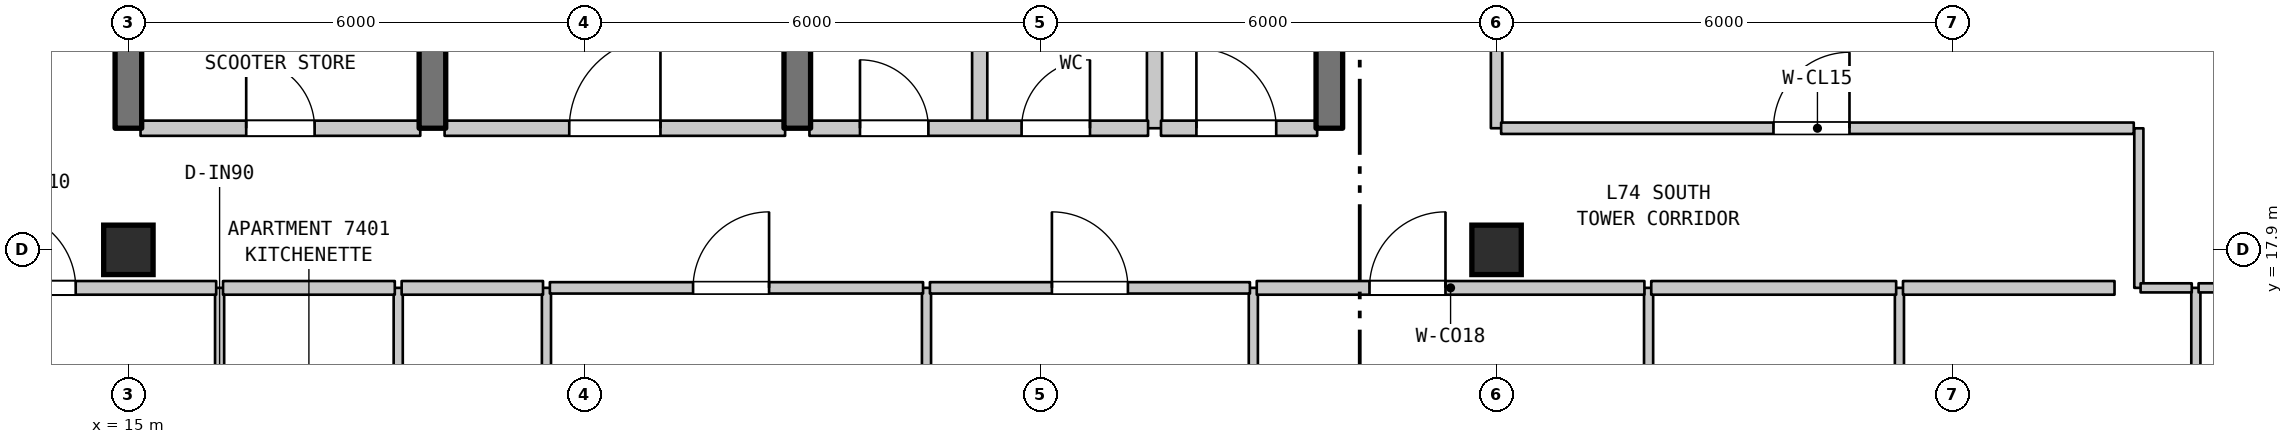
"""IFC4 building model, lengths in metres.
Left out: names, types, materials, properties, quantities, classifications, styles, units other than length and angle.
Written with IfcOpenShell. Run it as: python <this file> out.ifc"""

import sys

from ifc_helpers import new_model, si_unit, direction, frame, frame_2d, origin, origin_2d, place, context, subcontext, project, spatial, rectangle, extrude, element, fill, save


model = new_model("IFC4")
c1 = context("Model", 3, precision=1e-05, world=origin(), true_north=direction((0.0, 1.0)))
c2 = subcontext(c1, "Body", "Model", "MODEL_VIEW")
j1 = project(units=[si_unit("LENGTHUNIT", "METRE"), si_unit("PLANEANGLEUNIT", "RADIAN")], contexts=[c1])
p1 = place(None, origin())
s1 = spatial("IfcSite", under=j1, at=p1, CompositionType="ELEMENT")
p2 = place(p1, origin())
s2 = spatial("IfcBuilding", under=s1, at=p2, CompositionType="ELEMENT")
p3 = place(p2, frame((0.0, 0.0, 295.4)))
s3 = spatial("IfcBuildingStorey", under=s2, at=p3, CompositionType="ELEMENT", Elevation=295.4)
for number, where, z_axis, x_axis in (
    (1, (15.0, 17.9, 0.0), (0.0, 0.0, 1.0), (1.0, 0.0, 0.0)),
    (2, (33.0, 17.9, 0.0), (0.0, 0.0, 1.0), (1.0, 0.0, 0.0)),
):
    element("IfcColumn", number, at=place(p3, frame(where, z_axis=z_axis, x_axis=x_axis)), inside=s3, PredefinedType="COLUMN", context=c2, shape_type="SweptSolid", body=[
        extrude(rectangle(XDim=0.65, YDim=0.65, at=origin_2d()), origin(), (0.0, 0.0, 1.0), 3.7),
    ])
p4 = place(p3, frame((15.0, 19.5, 0.0), z_axis=(0.0, 0.0, 1.0), x_axis=(0.0, 1.0, 0.0)))
e3 = element("IfcWall", 3, at=p4, inside=s3, PredefinedType="SHEAR", context=c2, shape_type="SweptSolid", body=[
    extrude(rectangle(XDim=3.2, YDim=0.35, at=frame_2d((1.6, 0.0))), origin(), (0.0, 0.0, 1.0), 3.38),
])
p5 = place(p3, frame((16.2, 14.2, 0.0), z_axis=(0.0, 0.0, 1.0), x_axis=(0.0, 1.0, 0.0)))
e4 = element("IfcWall", 4, at=p5, inside=s3, PredefinedType="PARTITIONING", context=c2, shape_type="SweptSolid", body=[
    extrude(rectangle(XDim=3.2, YDim=0.12, at=frame_2d((1.6, 0.0))), origin(), (0.0, 0.0, 1.0), 3.38),
])
p6 = place(p5, frame((1.15, 0.0, 0.0)))
e5 = element("IfcOpeningElement", 5, at=p6, cuts=e4, PredefinedType="OPENING", context=c2, shape_type="SweptSolid", body=[
    extrude(rectangle(XDim=0.9, YDim=2.15, at=frame_2d((0.45, 1.075))), frame((0.0, 0.07, 0.0), z_axis=(0.0, -1.0, 0.0), x_axis=(1.0, 0.0, 0.0)), (0.0, 0.0, 1.0), 0.14),
])
p7 = place(p3, frame((18.55, 14.2, 0.0), z_axis=(0.0, 0.0, 1.0), x_axis=(0.0, 1.0, 0.0)))
e6 = element("IfcWall", 6, at=p7, inside=s3, PredefinedType="PARTITIONING", context=c2, shape_type="SweptSolid", body=[
    extrude(rectangle(XDim=3.2, YDim=0.12, at=frame_2d((1.6, 0.0))), origin(), (0.0, 0.0, 1.0), 3.38),
])
p8 = place(p3, frame((19.0, 19.5, 0.0), z_axis=(0.0, 0.0, 1.0), x_axis=(0.0, 1.0, 0.0)))
e7 = element("IfcWall", 7, at=p8, inside=s3, PredefinedType="SHEAR", context=c2, shape_type="SweptSolid", body=[
    extrude(rectangle(XDim=3.2, YDim=0.35, at=frame_2d((1.6, 0.0))), origin(), (0.0, 0.0, 1.0), 3.38),
])
p9 = place(p3, frame((20.5, 7.189, 0.0), z_axis=(0.0, 0.0, 1.0), x_axis=(0.0, 1.0, 0.0)))
e8 = element("IfcWall", 8, at=p9, inside=s3, PredefinedType="PARTITIONING", context=c2, shape_type="SweptSolid", body=[
    extrude(rectangle(XDim=10.211, YDim=0.12, at=frame_2d((5.105, 0.0))), origin(), (0.0, 0.0, 1.0), 3.38),
])
p10 = place(p3, frame((23.8, 19.5, 0.0), z_axis=(0.0, 0.0, 1.0), x_axis=(0.0, 1.0, 0.0)))
e9 = element("IfcWall", 9, at=p10, inside=s3, PredefinedType="SHEAR", context=c2, shape_type="SweptSolid", body=[
    extrude(rectangle(XDim=3.2, YDim=0.35, at=frame_2d((1.6, 0.0))), origin(), (0.0, 0.0, 1.0), 3.38),
])
p11 = place(p3, frame((25.5, 6.71, 0.0), z_axis=(0.0, 0.0, 1.0), x_axis=(0.0, 1.0, 0.0)))
e10 = element("IfcWall", 10, at=p11, inside=s3, PredefinedType="PARTITIONING", context=c2, shape_type="SweptSolid", body=[
    extrude(rectangle(XDim=10.69, YDim=0.12, at=frame_2d((5.345, 0.0))), origin(), (0.0, 0.0, 1.0), 3.38),
])
for number, where, z_axis, x_axis in (
    (11, (26.2, 19.5, 0.0), (0.0, 0.0, 1.0), (0.0, 1.0, 0.0)),
    (12, (28.5, 19.5, 0.0), (0.0, 0.0, 1.0), (0.0, 1.0, 0.0)),
):
    element("IfcWall", number, at=place(p3, frame(where, z_axis=z_axis, x_axis=x_axis)), inside=s3, PredefinedType="STANDARD", context=c2, shape_type="SweptSolid", body=[
        extrude(rectangle(XDim=3.2, YDim=0.2, at=frame_2d((1.6, 0.0))), origin(), (0.0, 0.0, 1.0), 3.38),
    ])
p12 = place(p3, frame((29.8, 6.71, 0.0), z_axis=(0.0, 0.0, 1.0), x_axis=(0.0, 1.0, 0.0)))
e13 = element("IfcWall", 13, at=p12, inside=s3, PredefinedType="PARTITIONING", context=c2, shape_type="SweptSolid", body=[
    extrude(rectangle(XDim=10.69, YDim=0.12, at=frame_2d((5.345, 0.0))), origin(), (0.0, 0.0, 1.0), 3.38),
])
p13 = place(p3, frame((30.8, 19.5, 0.0), z_axis=(0.0, 0.0, 1.0), x_axis=(0.0, 1.0, 0.0)))
e14 = element("IfcWall", 14, at=p13, inside=s3, PredefinedType="SHEAR", context=c2, shape_type="SweptSolid", body=[
    extrude(rectangle(XDim=3.2, YDim=0.35, at=frame_2d((1.6, 0.0))), origin(), (0.0, 0.0, 1.0), 3.38),
])
p14 = place(p3, frame((33.0, 19.5, 0.0), z_axis=(0.0, 0.0, 1.0), x_axis=(0.0, 1.0, 0.0)))
e15 = element("IfcWall", 15, at=p14, inside=s3, PredefinedType="STANDARD", context=c2, shape_type="SweptSolid", body=[
    extrude(rectangle(XDim=5.1, YDim=0.15, at=frame_2d((2.55, 0.0))), origin(), (0.0, 0.0, 1.0), 3.09),
])
p15 = place(p14, frame((1.547, 0.0, 0.0)))
e16 = element("IfcOpeningElement", 16, at=p15, cuts=e15, PredefinedType="OPENING", context=c2, shape_type="SweptSolid", body=[
    extrude(rectangle(XDim=1.0, YDim=2.15, at=frame_2d((0.5, 1.075))), frame((0.0, 0.085, 0.0), z_axis=(0.0, -1.0, 0.0), x_axis=(1.0, 0.0, 0.0)), (0.0, 0.0, 1.0), 0.17),
])
for number, where, z_axis, x_axis in (
    (17, (35.0, 13.62, 0.0), (0.0, 0.0, 1.0), (0.0, 1.0, 0.0)),
    (18, (38.3, 13.62, 0.0), (0.0, 0.0, 1.0), (0.0, 1.0, 0.0)),
):
    element("IfcWall", number, at=place(p3, frame(where, z_axis=z_axis, x_axis=x_axis)), inside=s3, PredefinedType="PARTITIONING", context=c2, shape_type="SweptSolid", body=[
        extrude(rectangle(XDim=3.78, YDim=0.12, at=frame_2d((1.89, 0.0))), origin(), (0.0, 0.0, 1.0), 3.38),
    ])
p16 = place(p3, frame((41.45, 17.4, 0.0), z_axis=(0.0, 0.0, 1.0), x_axis=(0.0, 1.0, 0.0)))
e19 = element("IfcWall", 19, at=p16, inside=s3, PredefinedType="PARTITIONING", context=c2, shape_type="SweptSolid", body=[
    extrude(rectangle(XDim=2.099, YDim=0.12, at=frame_2d((1.05, 0.0))), origin(), (0.0, 0.0, 1.0), 3.38),
])
p17 = place(p3, frame((42.2, 13.62, 0.0), z_axis=(0.0, 0.0, 1.0), x_axis=(0.0, 1.0, 0.0)))
e20 = element("IfcWall", 20, at=p17, inside=s3, PredefinedType="PARTITIONING", context=c2, shape_type="SweptSolid", body=[
    extrude(rectangle(XDim=3.78, YDim=0.12, at=frame_2d((1.89, 0.0))), origin(), (0.0, 0.0, 1.0), 3.38),
])
p18 = place(p3, frame((12.975, 17.4, 0.0), z_axis=(0.0, 0.0, 1.0), x_axis=(1.0, 0.0, 0.0)))
e21 = element("IfcWall", 21, at=p18, inside=s3, PredefinedType="STANDARD", context=c2, shape_type="SweptSolid", body=[
    extrude(rectangle(XDim=3.18, YDim=0.18, at=frame_2d((1.59, 0.0))), origin(), (0.0, 0.0, 1.0), 3.38),
])
p19 = place(p18, frame((0.332, 0.0, 0.0)))
e22 = element("IfcOpeningElement", 22, at=p19, cuts=e21, PredefinedType="OPENING", context=c2, shape_type="SweptSolid", body=[
    extrude(rectangle(XDim=1.0, YDim=2.15, at=frame_2d((0.5, 1.075))), frame((0.0, 0.1, 0.0), z_axis=(0.0, -1.0, 0.0), x_axis=(1.0, 0.0, 0.0)), (0.0, 0.0, 1.0), 0.2),
])
p20 = place(p3, frame((16.245, 17.4, 0.0), z_axis=(0.0, 0.0, 1.0), x_axis=(1.0, 0.0, 0.0)))
e23 = element("IfcWall", 23, at=p20, inside=s3, PredefinedType="STANDARD", context=c2, shape_type="SweptSolid", body=[
    extrude(rectangle(XDim=2.26, YDim=0.18, at=frame_2d((1.13, 0.0))), origin(), (0.0, 0.0, 1.0), 3.38),
])
p21 = place(p3, frame((18.595, 17.4, 0.0), z_axis=(0.0, 0.0, 1.0), x_axis=(1.0, 0.0, 0.0)))
e24 = element("IfcWall", 24, at=p21, inside=s3, PredefinedType="STANDARD", context=c2, shape_type="SweptSolid", body=[
    extrude(rectangle(XDim=1.86, YDim=0.18, at=frame_2d((0.93, 0.0))), origin(), (0.0, 0.0, 1.0), 3.38),
])
p22 = place(p3, frame((20.545, 17.4, 0.0), z_axis=(0.0, 0.0, 1.0), x_axis=(1.0, 0.0, 0.0)))
e25 = element("IfcWall", 25, at=p22, inside=s3, PredefinedType="STANDARD", context=c2, shape_type="SweptSolid", body=[
    extrude(rectangle(XDim=4.91, YDim=0.15, at=frame_2d((2.455, 0.0))), origin(), (0.0, 0.0, 1.0), 3.38),
])
p23 = place(p22, frame((1.884, 0.0, 0.0)))
e26 = element("IfcOpeningElement", 26, at=p23, cuts=e25, PredefinedType="OPENING", context=c2, shape_type="SweptSolid", body=[
    extrude(rectangle(XDim=1.0, YDim=2.15, at=frame_2d((0.5, 1.075))), frame((0.0, 0.085, 0.0), z_axis=(0.0, -1.0, 0.0), x_axis=(1.0, 0.0, 0.0)), (0.0, 0.0, 1.0), 0.17),
])
p24 = place(p3, frame((25.545, 17.4, 0.0), z_axis=(0.0, 0.0, 1.0), x_axis=(1.0, 0.0, 0.0)))
e27 = element("IfcWall", 27, at=p24, inside=s3, PredefinedType="STANDARD", context=c2, shape_type="SweptSolid", body=[
    extrude(rectangle(XDim=4.21, YDim=0.15, at=frame_2d((2.105, 0.0))), origin(), (0.0, 0.0, 1.0), 3.38),
])
p25 = place(p24, frame((1.605, 0.0, 0.0)))
e28 = element("IfcOpeningElement", 28, at=p25, cuts=e27, PredefinedType="OPENING", context=c2, shape_type="SweptSolid", body=[
    extrude(rectangle(XDim=1.0, YDim=2.15, at=frame_2d((0.5, 1.075))), frame((0.0, 0.085, 0.0), z_axis=(0.0, -1.0, 0.0), x_axis=(1.0, 0.0, 0.0)), (0.0, 0.0, 1.0), 0.17),
])
p26 = place(p3, frame((29.845, 17.4, 0.0), z_axis=(0.0, 0.0, 1.0), x_axis=(1.0, 0.0, 0.0)))
e29 = element("IfcWall", 29, at=p26, inside=s3, PredefinedType="STANDARD", context=c2, shape_type="SweptSolid", body=[
    extrude(rectangle(XDim=5.1, YDim=0.18, at=frame_2d((2.55, 0.0))), origin(), (0.0, 0.0, 1.0), 3.38),
])
p27 = place(p26, frame((1.483, 0.0, 0.0)))
e30 = element("IfcOpeningElement", 30, at=p27, cuts=e29, PredefinedType="OPENING", context=c2, shape_type="SweptSolid", body=[
    extrude(rectangle(XDim=1.0, YDim=2.15, at=frame_2d((0.5, 1.075))), frame((0.0, 0.1, 0.0), z_axis=(0.0, -1.0, 0.0), x_axis=(1.0, 0.0, 0.0)), (0.0, 0.0, 1.0), 0.2),
])
p28 = place(p3, frame((35.035, 17.4, 0.0), z_axis=(0.0, 0.0, 1.0), x_axis=(1.0, 0.0, 0.0)))
e31 = element("IfcWall", 31, at=p28, inside=s3, PredefinedType="STANDARD", context=c2, shape_type="SweptSolid", body=[
    extrude(rectangle(XDim=3.222, YDim=0.18, at=frame_2d((1.611, 0.0))), origin(), (0.0, 0.0, 1.0), 3.38),
])
p29 = place(p3, frame((38.347, 17.4, 0.0), z_axis=(0.0, 0.0, 1.0), x_axis=(1.0, 0.0, 0.0)))
e32 = element("IfcWall", 32, at=p29, inside=s3, PredefinedType="STANDARD", context=c2, shape_type="SweptSolid", body=[
    extrude(rectangle(XDim=2.783, YDim=0.18, at=frame_2d((1.392, 0.0))), origin(), (0.0, 0.0, 1.0), 3.38),
])
p30 = place(p3, frame((41.473, 17.4, 0.0), z_axis=(0.0, 0.0, 1.0), x_axis=(1.0, 0.0, 0.0)))
e33 = element("IfcWall", 33, at=p30, inside=s3, PredefinedType="PARTITIONING", context=c2, shape_type="SweptSolid", body=[
    extrude(rectangle(XDim=0.673, YDim=0.12, at=frame_2d((0.336, 0.0))), origin(), (0.0, 0.0, 1.0), 3.38),
])
p31 = place(p3, frame((42.236, 17.4, 0.0), z_axis=(0.0, 0.0, 1.0), x_axis=(1.0, 0.0, 0.0)))
e34 = element("IfcWall", 34, at=p31, inside=s3, PredefinedType="PARTITIONING", context=c2, shape_type="SweptSolid", body=[
    extrude(rectangle(XDim=1.268, YDim=0.12, at=frame_2d((0.634, 0.0))), origin(), (0.0, 0.0, 1.0), 3.38),
])
p32 = place(p3, frame((15.16, 19.5, 0.0), z_axis=(0.0, 0.0, 1.0), x_axis=(1.0, 0.0, 0.0)))
e35 = element("IfcWall", 35, at=p32, inside=s3, PredefinedType="STANDARD", context=c2, shape_type="SweptSolid", body=[
    extrude(rectangle(XDim=3.68, YDim=0.2, at=frame_2d((1.84, 0.0))), origin(), (0.0, 0.0, 1.0), 3.38),
])
p33 = place(p32, frame((1.39, 0.0, 0.0)))
e36 = element("IfcOpeningElement", 36, at=p33, cuts=e35, PredefinedType="OPENING", context=c2, shape_type="SweptSolid", body=[
    extrude(rectangle(XDim=0.9, YDim=2.15, at=frame_2d((0.45, 1.075))), frame((0.0, 0.11, 0.0), z_axis=(0.0, -1.0, 0.0), x_axis=(1.0, 0.0, 0.0)), (0.0, 0.0, 1.0), 0.22),
])
p34 = place(p3, frame((19.16, 19.5, 0.0), z_axis=(0.0, 0.0, 1.0), x_axis=(1.0, 0.0, 0.0)))
e37 = element("IfcWall", 37, at=p34, inside=s3, PredefinedType="STANDARD", context=c2, shape_type="SweptSolid", body=[
    extrude(rectangle(XDim=4.48, YDim=0.2, at=frame_2d((2.24, 0.0))), origin(), (0.0, 0.0, 1.0), 3.38),
])
p35 = place(p34, frame((1.64, 0.0, 0.0)))
e38 = element("IfcOpeningElement", 38, at=p35, cuts=e37, PredefinedType="OPENING", context=c2, shape_type="SweptSolid", body=[
    extrude(rectangle(XDim=1.2, YDim=2.2, at=frame_2d((0.6, 1.1))), frame((0.0, 0.11, 0.0), z_axis=(0.0, -1.0, 0.0), x_axis=(1.0, 0.0, 0.0)), (0.0, 0.0, 1.0), 0.22),
])
p36 = place(p3, frame((23.96, 19.5, 0.0), z_axis=(0.0, 0.0, 1.0), x_axis=(1.0, 0.0, 0.0)))
e39 = element("IfcWall", 39, at=p36, inside=s3, PredefinedType="STANDARD", context=c2, shape_type="SweptSolid", body=[
    extrude(rectangle(XDim=4.455, YDim=0.2, at=frame_2d((2.228, 0.0))), origin(), (0.0, 0.0, 1.0), 3.38),
])
p37 = place(p36, frame((0.665, 0.0, 0.0)))
e40 = element("IfcOpeningElement", 40, at=p37, cuts=e39, PredefinedType="OPENING", context=c2, shape_type="SweptSolid", body=[
    extrude(rectangle(XDim=0.9, YDim=2.15, at=frame_2d((0.45, 1.075))), frame((0.0, 0.11, 0.0), z_axis=(0.0, -1.0, 0.0), x_axis=(1.0, 0.0, 0.0)), (0.0, 0.0, 1.0), 0.22),
])
p38 = place(p36, frame((2.791, 0.0, 0.0)))
e41 = element("IfcOpeningElement", 41, at=p38, cuts=e39, PredefinedType="OPENING", context=c2, shape_type="SweptSolid", body=[
    extrude(rectangle(XDim=0.9, YDim=2.15, at=frame_2d((0.45, 1.075))), frame((0.0, 0.11, 0.0), z_axis=(0.0, -1.0, 0.0), x_axis=(1.0, 0.0, 0.0)), (0.0, 0.0, 1.0), 0.22),
])
p39 = place(p3, frame((28.585, 19.5, 0.0), z_axis=(0.0, 0.0, 1.0), x_axis=(1.0, 0.0, 0.0)))
e42 = element("IfcWall", 42, at=p39, inside=s3, PredefinedType="STANDARD", context=c2, shape_type="SweptSolid", body=[
    extrude(rectangle(XDim=2.055, YDim=0.2, at=frame_2d((1.027, 0.0))), origin(), (0.0, 0.0, 1.0), 3.38),
])
p40 = place(p39, frame((0.466, 0.0, 0.0)))
e43 = element("IfcOpeningElement", 43, at=p40, cuts=e42, PredefinedType="OPENING", context=c2, shape_type="SweptSolid", body=[
    extrude(rectangle(XDim=1.05, YDim=2.15, at=frame_2d((0.525, 1.075))), frame((0.0, 0.11, 0.0), z_axis=(0.0, -1.0, 0.0), x_axis=(1.0, 0.0, 0.0)), (0.0, 0.0, 1.0), 0.22),
])
p41 = place(p3, frame((33.06, 19.5, 0.0), z_axis=(0.0, 0.0, 1.0), x_axis=(1.0, 0.0, 0.0)))
e44 = element("IfcWall", 44, at=p41, inside=s3, PredefinedType="STANDARD", context=c2, shape_type="SweptSolid", body=[
    extrude(rectangle(XDim=8.323, YDim=0.15, at=frame_2d((4.162, 0.0))), origin(), (0.0, 0.0, 1.0), 3.38),
])
p42 = place(p41, frame((3.583, 0.0, 0.0)))
e45 = element("IfcOpeningElement", 45, at=p42, cuts=e44, PredefinedType="OPENING", context=c2, shape_type="SweptSolid", body=[
    extrude(rectangle(XDim=1.0, YDim=2.15, at=frame_2d((0.5, 1.075))), frame((0.0, 0.085, 0.0), z_axis=(0.0, -1.0, 0.0), x_axis=(1.0, 0.0, 0.0)), (0.0, 0.0, 1.0), 0.17),
])
p43 = place(p19, origin())
e46 = element("IfcDoor", 46, at=p43, inside=s3, OperationType="SINGLE_SWING_LEFT", PredefinedType="DOOR", context=c2, shape_type="SweptSolid", body=[
    extrude(rectangle(XDim=1.0, YDim=2.15, at=frame_2d((0.5, 1.075))), frame((0.0, 0.025, 0.0), z_axis=(0.0, -1.0, 0.0), x_axis=(1.0, 0.0, 0.0)), (0.0, 0.0, 1.0), 0.05),
])
fill(e22, e46)
p44 = place(p23, origin())
e47 = element("IfcDoor", 47, at=p44, inside=s3, OperationType="SINGLE_SWING_RIGHT", PredefinedType="DOOR", context=c2, shape_type="SweptSolid", body=[
    extrude(rectangle(XDim=1.0, YDim=2.15, at=frame_2d((0.5, 1.075))), frame((0.0, 0.025, 0.0), z_axis=(0.0, -1.0, 0.0), x_axis=(1.0, 0.0, 0.0)), (0.0, 0.0, 1.0), 0.05),
])
fill(e26, e47)
p45 = place(p25, origin())
e48 = element("IfcDoor", 48, at=p45, inside=s3, OperationType="SINGLE_SWING_LEFT", PredefinedType="DOOR", context=c2, shape_type="SweptSolid", body=[
    extrude(rectangle(XDim=1.0, YDim=2.15, at=frame_2d((0.5, 1.075))), frame((0.0, 0.025, 0.0), z_axis=(0.0, -1.0, 0.0), x_axis=(1.0, 0.0, 0.0)), (0.0, 0.0, 1.0), 0.05),
])
fill(e28, e48)
p46 = place(p27, origin())
e49 = element("IfcDoor", 49, at=p46, inside=s3, OperationType="SINGLE_SWING_RIGHT", PredefinedType="DOOR", context=c2, shape_type="SweptSolid", body=[
    extrude(rectangle(XDim=1.0, YDim=2.15, at=frame_2d((0.5, 1.075))), frame((0.0, 0.025, 0.0), z_axis=(0.0, -1.0, 0.0), x_axis=(1.0, 0.0, 0.0)), (0.0, 0.0, 1.0), 0.05),
])
fill(e30, e49)
p47 = place(p33, origin())
e50 = element("IfcDoor", 50, at=p47, inside=s3, OperationType="SINGLE_SWING_LEFT", PredefinedType="DOOR", context=c2, shape_type="SweptSolid", body=[
    extrude(rectangle(XDim=0.9, YDim=2.15, at=frame_2d((0.45, 1.075))), frame((0.0, 0.025, 0.0), z_axis=(0.0, -1.0, 0.0), x_axis=(1.0, 0.0, 0.0)), (0.0, 0.0, 1.0), 0.05),
])
fill(e36, e50)
p48 = place(p35, origin())
e51 = element("IfcDoor", 51, at=p48, inside=s3, OperationType="SINGLE_SWING_RIGHT", PredefinedType="DOOR", context=c2, shape_type="SweptSolid", body=[
    extrude(rectangle(XDim=1.2, YDim=2.2, at=frame_2d((0.6, 1.1))), frame((0.0, 0.025, 0.0), z_axis=(0.0, -1.0, 0.0), x_axis=(1.0, 0.0, 0.0)), (0.0, 0.0, 1.0), 0.05),
])
fill(e38, e51)
p49 = place(p37, origin())
e52 = element("IfcDoor", 52, at=p49, inside=s3, OperationType="SINGLE_SWING_LEFT", PredefinedType="DOOR", context=c2, shape_type="SweptSolid", body=[
    extrude(rectangle(XDim=0.9, YDim=2.15, at=frame_2d((0.45, 1.075))), frame((0.0, 0.025, 0.0), z_axis=(0.0, -1.0, 0.0), x_axis=(1.0, 0.0, 0.0)), (0.0, 0.0, 1.0), 0.05),
])
fill(e40, e52)
p50 = place(p38, origin())
e53 = element("IfcDoor", 53, at=p50, inside=s3, OperationType="SINGLE_SWING_RIGHT", PredefinedType="DOOR", context=c2, shape_type="SweptSolid", body=[
    extrude(rectangle(XDim=0.9, YDim=2.15, at=frame_2d((0.45, 1.075))), frame((0.0, 0.025, 0.0), z_axis=(0.0, -1.0, 0.0), x_axis=(1.0, 0.0, 0.0)), (0.0, 0.0, 1.0), 0.05),
])
fill(e41, e53)
p51 = place(p40, origin())
e54 = element("IfcDoor", 54, at=p51, inside=s3, OperationType="SINGLE_SWING_LEFT", PredefinedType="DOOR", context=c2, shape_type="SweptSolid", body=[
    extrude(rectangle(XDim=1.05, YDim=2.15, at=frame_2d((0.525, 1.075))), frame((0.0, 0.025, 0.0), z_axis=(0.0, -1.0, 0.0), x_axis=(1.0, 0.0, 0.0)), (0.0, 0.0, 1.0), 0.05),
])
fill(e43, e54)
p52 = place(p42, origin())
e55 = element("IfcDoor", 55, at=p52, inside=s3, OperationType="SINGLE_SWING_RIGHT", PredefinedType="DOOR", context=c2, shape_type="SweptSolid", body=[
    extrude(rectangle(XDim=1.0, YDim=2.15, at=frame_2d((0.5, 1.075))), frame((0.0, 0.025, 0.0), z_axis=(0.0, -1.0, 0.0), x_axis=(1.0, 0.0, 0.0)), (0.0, 0.0, 1.0), 0.05),
])
fill(e45, e55)
save(model, sys.argv[1])
